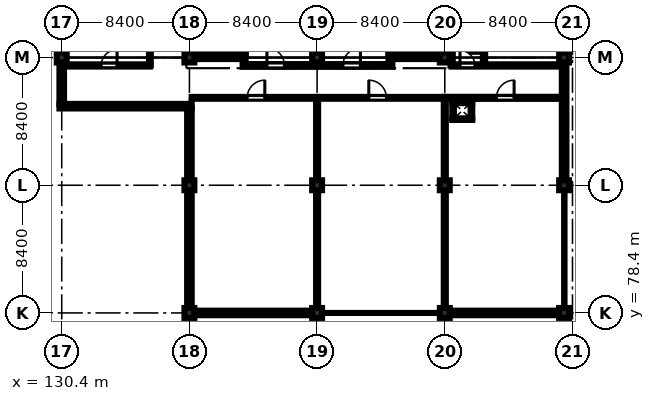
"""IFC4 building model, lengths in metres.
Left out: names, types, materials, properties, quantities, classifications, styles, units other than length and angle.
Written with IfcOpenShell. Run it as: python <this file> out.ifc"""

import sys

from ifc_helpers import new_model, si_unit, direction, frame, frame_2d, origin, origin_2d, place, context, subcontext, project, spatial, rectangle, extrude, element, fill, save


model = new_model("IFC4")
c1 = context("Model", 3, precision=1e-05, world=origin(), true_north=direction((0.0, 1.0)))
c2 = subcontext(c1, "Body", "Model", "MODEL_VIEW")
j1 = project(units=[si_unit("LENGTHUNIT", "METRE"), si_unit("PLANEANGLEUNIT", "RADIAN")], contexts=[c1])
p1 = place(None, origin())
s1 = spatial("IfcSite", under=j1, at=p1, CompositionType="ELEMENT")
p2 = place(p1, origin())
s2 = spatial("IfcBuilding", under=s1, at=p2, CompositionType="ELEMENT")
p3 = place(p2, frame((0.0, 0.0, 57.0)))
s3 = spatial("IfcBuildingStorey", under=s2, at=p3, CompositionType="ELEMENT", Elevation=57.0)
for number, where, z_axis, x_axis in (
    (1, (130.4, 95.2, 0.0), (0.0, 0.0, 1.0), (1.0, 0.0, 0.0)),
    (2, (138.8, 78.4, 0.0), (0.0, 0.0, 1.0), (1.0, 0.0, 0.0)),
    (3, (138.8, 86.8, 0.0), (0.0, 0.0, 1.0), (1.0, 0.0, 0.0)),
    (4, (138.8, 95.2, 0.0), (0.0, 0.0, 1.0), (1.0, 0.0, 0.0)),
    (5, (147.2, 78.4, 0.0), (0.0, 0.0, 1.0), (1.0, 0.0, 0.0)),
    (6, (147.2, 86.8, 0.0), (0.0, 0.0, 1.0), (1.0, 0.0, 0.0)),
    (7, (147.2, 95.2, 0.0), (0.0, 0.0, 1.0), (1.0, 0.0, 0.0)),
    (8, (155.6, 78.4, 0.0), (0.0, 0.0, 1.0), (1.0, 0.0, 0.0)),
    (9, (155.6, 86.8, 0.0), (0.0, 0.0, 1.0), (1.0, 0.0, 0.0)),
    (10, (155.6, 95.2, 0.0), (0.0, 0.0, 1.0), (1.0, 0.0, 0.0)),
    (11, (163.45, 78.4, 0.0), (0.0, 0.0, 1.0), (1.0, 0.0, 0.0)),
    (12, (163.45, 86.8, 0.0), (0.0, 0.0, 1.0), (1.0, 0.0, 0.0)),
    (13, (163.45, 95.2, 0.0), (0.0, 0.0, 1.0), (1.0, 0.0, 0.0)),
):
    element("IfcColumn", number, at=place(p3, frame(where, z_axis=z_axis, x_axis=x_axis)), inside=s3, PredefinedType="COLUMN", context=c2, shape_type="SweptSolid", body=[
        extrude(rectangle(XDim=0.65, YDim=0.65, at=origin_2d()), origin(), (0.0, 0.0, 1.0), 4.02),
    ])
p4 = place(p3, frame((138.7, 95.275, 0.0), z_axis=(0.0, 0.0, 1.0), x_axis=(1.0, 0.0, 0.0)))
e14 = element("IfcWall", 14, at=p4, inside=s3, PredefinedType="SHEAR", context=c2, shape_type="SweptSolid", body=[
    extrude(rectangle(XDim=3.8, YDim=0.35, at=frame_2d((1.9, 0.0))), origin(), (0.0, 0.0, 1.0), 4.02),
])
p5 = place(p3, frame((138.875, 95.45, 0.0), z_axis=(0.0, 0.0, 1.0), x_axis=(0.0, 1.0, 0.0)))
e15 = element("IfcWall", 15, at=p5, inside=s3, PredefinedType="SHEAR", context=c2, shape_type="SweptSolid", body=[
    extrude(rectangle(XDim=7.9, YDim=0.35, at=frame_2d((3.95, 0.0))), origin(), (0.0, 0.0, 1.0), 4.02),
])
p6 = place(p3, frame((142.325, 95.45, 0.0), z_axis=(0.0, 0.0, 1.0), x_axis=(0.0, 1.0, 0.0)))
e16 = element("IfcWall", 16, at=p6, inside=s3, PredefinedType="SHEAR", context=c2, shape_type="SweptSolid", body=[
    extrude(rectangle(XDim=7.9, YDim=0.35, at=frame_2d((3.95, 0.0))), origin(), (0.0, 0.0, 1.0), 4.02),
])
p7 = place(p6, frame((0.22, 0.0, 0.0)))
e17 = element("IfcOpeningElement", 17, at=p7, cuts=e16, PredefinedType="OPENING", context=c2, shape_type="SweptSolid", body=[
    extrude(rectangle(XDim=1.15, YDim=2.15, at=frame_2d((0.575, 1.075))), frame((0.0, 0.185, 0.0), z_axis=(0.0, -1.0, 0.0), x_axis=(1.0, 0.0, 0.0)), (0.0, 0.0, 1.0), 0.37),
])
p8 = place(p3, frame((151.9, 95.275, 0.0), z_axis=(0.0, 0.0, 1.0), x_axis=(1.0, 0.0, 0.0)))
e18 = element("IfcWall", 18, at=p8, inside=s3, PredefinedType="SHEAR", context=c2, shape_type="SweptSolid", body=[
    extrude(rectangle(XDim=3.8, YDim=0.35, at=frame_2d((1.9, 0.0))), origin(), (0.0, 0.0, 1.0), 4.02),
])
p9 = place(p3, frame((152.075, 95.45, 0.0), z_axis=(0.0, 0.0, 1.0), x_axis=(0.0, 1.0, 0.0)))
e19 = element("IfcWall", 19, at=p9, inside=s3, PredefinedType="SHEAR", context=c2, shape_type="SweptSolid", body=[
    extrude(rectangle(XDim=7.9, YDim=0.35, at=frame_2d((3.95, 0.0))), origin(), (0.0, 0.0, 1.0), 4.02),
])
p10 = place(p9, frame((0.35, 0.0, 0.0)))
e20 = element("IfcOpeningElement", 20, at=p10, cuts=e19, PredefinedType="OPENING", context=c2, shape_type="SweptSolid", body=[
    extrude(rectangle(XDim=1.15, YDim=2.15, at=frame_2d((0.575, 1.075))), frame((0.0, 0.185, 0.0), z_axis=(0.0, -1.0, 0.0), x_axis=(1.0, 0.0, 0.0)), (0.0, 0.0, 1.0), 0.37),
])
p11 = place(p3, frame((155.525, 95.45, 0.0), z_axis=(0.0, 0.0, 1.0), x_axis=(0.0, 1.0, 0.0)))
e21 = element("IfcWall", 21, at=p11, inside=s3, PredefinedType="SHEAR", context=c2, shape_type="SweptSolid", body=[
    extrude(rectangle(XDim=7.9, YDim=0.35, at=frame_2d((3.95, 0.0))), origin(), (0.0, 0.0, 1.0), 4.02),
])
p12 = place(p3, frame((146.875, 78.4, 0.0), z_axis=(0.0, 0.0, 1.0), x_axis=(-1.0, 0.0, 0.0)))
e22 = element("IfcWall", 22, at=p12, inside=s3, PredefinedType="STANDARD", context=c2, shape_type="SweptSolid", body=[
    extrude(rectangle(XDim=7.75, YDim=0.3, at=frame_2d((3.875, 0.0))), origin(), (0.0, 0.0, 1.0), 3.32),
])
p13 = place(p12, frame((1.15, 0.0, 0.95)))
e23 = element("IfcOpeningElement", 23, at=p13, cuts=e22, PredefinedType="OPENING", context=c2, shape_type="SweptSolid", body=[
    extrude(rectangle(XDim=1.75, YDim=1.85, at=frame_2d((0.875, 0.925))), frame((0.0, 0.16, 0.0), z_axis=(0.0, -1.0, 0.0), x_axis=(1.0, 0.0, 0.0)), (0.0, 0.0, 1.0), 0.32),
])
p14 = place(p3, frame((163.125, 78.4, 0.0), z_axis=(0.0, 0.0, 1.0), x_axis=(-1.0, 0.0, 0.0)))
e24 = element("IfcWall", 24, at=p14, inside=s3, PredefinedType="STANDARD", context=c2, shape_type="SweptSolid", body=[
    extrude(rectangle(XDim=7.2, YDim=0.3, at=frame_2d((3.6, 0.0))), origin(), (0.0, 0.0, 1.0), 3.32),
])
p15 = place(p14, frame((1.15, 0.0, 0.95)))
e25 = element("IfcOpeningElement", 25, at=p15, cuts=e24, PredefinedType="OPENING", context=c2, shape_type="SweptSolid", body=[
    extrude(rectangle(XDim=1.75, YDim=1.85, at=frame_2d((0.875, 0.925))), frame((0.0, 0.16, 0.0), z_axis=(0.0, -1.0, 0.0), x_axis=(1.0, 0.0, 0.0)), (0.0, 0.0, 1.0), 0.32),
])
p16 = place(p3, frame((163.45, 94.875, 0.0), z_axis=(0.0, 0.0, 1.0), x_axis=(0.0, -1.0, 0.0)))
e26 = element("IfcWall", 26, at=p16, inside=s3, PredefinedType="STANDARD", context=c2, shape_type="SweptSolid", body=[
    extrude(rectangle(XDim=7.75, YDim=0.3, at=frame_2d((3.875, 0.0))), origin(), (0.0, 0.0, 1.0), 3.32),
])
p17 = place(p16, frame((4.2, 0.0, 1.1)))
e27 = element("IfcOpeningElement", 27, at=p17, cuts=e26, PredefinedType="OPENING", context=c2, shape_type="SweptSolid", body=[
    extrude(rectangle(XDim=1.8, YDim=1.8, at=frame_2d((0.9, 0.9))), frame((0.0, 0.16, 0.0), z_axis=(0.0, -1.0, 0.0), x_axis=(1.0, 0.0, 0.0)), (0.0, 0.0, 1.0), 0.32),
])
p18 = place(p3, frame((163.45, 103.275, 0.0), z_axis=(0.0, 0.0, 1.0), x_axis=(0.0, -1.0, 0.0)))
e28 = element("IfcWall", 28, at=p18, inside=s3, PredefinedType="STANDARD", context=c2, shape_type="SweptSolid", body=[
    extrude(rectangle(XDim=7.75, YDim=0.3, at=frame_2d((3.875, 0.0))), origin(), (0.0, 0.0, 1.0), 3.32),
])
p19 = place(p18, frame((1.15, 0.0, 1.1)))
e29 = element("IfcOpeningElement", 29, at=p19, cuts=e28, PredefinedType="OPENING", context=c2, shape_type="SweptSolid", body=[
    extrude(rectangle(XDim=1.4, YDim=1.4, at=frame_2d((0.7, 0.7))), frame((0.0, 0.16, 0.0), z_axis=(0.0, -1.0, 0.0), x_axis=(1.0, 0.0, 0.0)), (0.0, 0.0, 1.0), 0.32),
])
p20 = place(p3, frame((130.4, 92.15, 0.0), z_axis=(0.0, 0.0, 1.0), x_axis=(0.0, 1.0, 0.0)))
e30 = element("IfcWall", 30, at=p20, inside=s3, PredefinedType="STANDARD", context=c2, shape_type="SweptSolid", body=[
    extrude(rectangle(XDim=2.725, YDim=0.3, at=frame_2d((1.363, 0.0))), origin(), (0.0, 0.0, 1.0), 4.02),
])
p21 = place(p3, frame((138.8, 78.725, 0.0), z_axis=(0.0, 0.0, 1.0), x_axis=(0.0, 1.0, 0.0)))
e31 = element("IfcWall", 31, at=p21, inside=s3, PredefinedType="STANDARD", context=c2, shape_type="SweptSolid", body=[
    extrude(rectangle(XDim=7.75, YDim=0.3, at=frame_2d((3.875, 0.0))), origin(), (0.0, 0.0, 1.0), 3.32),
])
p22 = place(p21, frame((2.4, 0.0, 0.95)))
e32 = element("IfcOpeningElement", 32, at=p22, cuts=e31, PredefinedType="OPENING", context=c2, shape_type="SweptSolid", body=[
    extrude(rectangle(XDim=1.5, YDim=1.8, at=frame_2d((0.75, 0.9))), frame((0.0, 0.16, 0.0), z_axis=(0.0, -1.0, 0.0), x_axis=(1.0, 0.0, 0.0)), (0.0, 0.0, 1.0), 0.32),
])
p23 = place(p3, frame((138.8, 87.125, 0.0), z_axis=(0.0, 0.0, 1.0), x_axis=(0.0, 1.0, 0.0)))
e33 = element("IfcWall", 33, at=p23, inside=s3, PredefinedType="STANDARD", context=c2, shape_type="SweptSolid", body=[
    extrude(rectangle(XDim=4.725, YDim=0.3, at=frame_2d((2.363, 0.0))), origin(), (0.0, 0.0, 1.0), 3.32),
])
p24 = place(p23, frame((2.4, 0.0, 0.95)))
e34 = element("IfcOpeningElement", 34, at=p24, cuts=e33, PredefinedType="OPENING", context=c2, shape_type="SweptSolid", body=[
    extrude(rectangle(XDim=1.5, YDim=1.8, at=frame_2d((0.75, 0.9))), frame((0.0, 0.16, 0.0), z_axis=(0.0, -1.0, 0.0), x_axis=(1.0, 0.0, 0.0)), (0.0, 0.0, 1.0), 0.32),
])
p25 = place(p3, frame((130.4, 95.525, 0.0), z_axis=(0.0, 0.0, 1.0), x_axis=(0.0, 1.0, 0.0)))
e35 = element("IfcWall", 35, at=p25, inside=s3, PredefinedType="STANDARD", context=c2, shape_type="SweptSolid", body=[
    extrude(rectangle(XDim=7.75, YDim=0.3, at=frame_2d((3.875, 0.0))), origin(), (0.0, 0.0, 1.0), 3.32),
])
p26 = place(p25, frame((2.4, 0.0, 1.0)))
e36 = element("IfcOpeningElement", 36, at=p26, cuts=e35, PredefinedType="OPENING", context=c2, shape_type="SweptSolid", body=[
    extrude(rectangle(XDim=1.8, YDim=1.8, at=frame_2d((0.9, 0.9))), frame((0.0, 0.16, 0.0), z_axis=(0.0, -1.0, 0.0), x_axis=(1.0, 0.0, 0.0)), (0.0, 0.0, 1.0), 0.32),
])
p27 = place(p3, frame((138.95, 92.0, 0.0), z_axis=(0.0, 0.0, 1.0), x_axis=(-1.0, 0.0, 0.0)))
e37 = element("IfcWall", 37, at=p27, inside=s3, PredefinedType="STANDARD", context=c2, shape_type="SweptSolid", body=[
    extrude(rectangle(XDim=8.7, YDim=0.3, at=frame_2d((4.35, 0.0))), origin(), (0.0, 0.0, 1.0), 4.02),
])
p28 = place(p3, frame((142.3, 94.68, 0.0), z_axis=(0.0, 0.0, 1.0), x_axis=(1.0, 0.0, 0.0)))
e38 = element("IfcWall", 38, at=p28, inside=s3, PredefinedType="STANDARD", context=c2, shape_type="SweptSolid", body=[
    extrude(rectangle(XDim=4.8, YDim=0.18, at=frame_2d((2.4, 0.0))), origin(), (0.0, 0.0, 1.0), 4.02),
])
p29 = place(p28, frame((1.6, 0.0, 0.0)))
e39 = element("IfcOpeningElement", 39, at=p29, cuts=e38, PredefinedType="OPENING", context=c2, shape_type="SweptSolid", body=[
    extrude(rectangle(XDim=1.15, YDim=2.15, at=frame_2d((0.575, 1.075))), frame((0.0, 0.1, 0.0), z_axis=(0.0, -1.0, 0.0), x_axis=(1.0, 0.0, 0.0)), (0.0, 0.0, 1.0), 0.2),
])
p30 = place(p3, frame((147.3, 94.68, 0.0), z_axis=(0.0, 0.0, 1.0), x_axis=(1.0, 0.0, 0.0)))
e40 = element("IfcWall", 40, at=p30, inside=s3, PredefinedType="STANDARD", context=c2, shape_type="SweptSolid", body=[
    extrude(rectangle(XDim=4.85, YDim=0.18, at=frame_2d((2.425, 0.0))), origin(), (0.0, 0.0, 1.0), 4.02),
])
p31 = place(p30, frame((1.6, 0.0, 0.0)))
e41 = element("IfcOpeningElement", 41, at=p31, cuts=e40, PredefinedType="OPENING", context=c2, shape_type="SweptSolid", body=[
    extrude(rectangle(XDim=1.15, YDim=2.15, at=frame_2d((0.575, 1.075))), frame((0.0, 0.1, 0.0), z_axis=(0.0, -1.0, 0.0), x_axis=(1.0, 0.0, 0.0)), (0.0, 0.0, 1.0), 0.2),
])
p32 = place(p3, frame((156.05, 94.68, 0.0), z_axis=(0.0, 0.0, 1.0), x_axis=(1.0, 0.0, 0.0)))
e42 = element("IfcWall", 42, at=p32, inside=s3, PredefinedType="PARTITIONING", context=c2, shape_type="SweptSolid", body=[
    extrude(rectangle(XDim=7.15, YDim=0.15, at=frame_2d((3.575, 0.0))), origin(), (0.0, 0.0, 1.0), 4.02),
])
p33 = place(p32, frame((0.55, 0.0, 0.0)))
e43 = element("IfcOpeningElement", 43, at=p33, cuts=e42, PredefinedType="OPENING", context=c2, shape_type="SweptSolid", body=[
    extrude(rectangle(XDim=0.98, YDim=2.12, at=frame_2d((0.49, 1.06))), frame((0.0, 0.085, 0.0), z_axis=(0.0, -1.0, 0.0), x_axis=(1.0, 0.0, 0.0)), (0.0, 0.0, 1.0), 0.17),
])
p34 = place(p3, frame((158.18, 94.68, 0.0), z_axis=(0.0, 0.0, 1.0), x_axis=(0.0, 1.0, 0.0)))
e44 = element("IfcWall", 44, at=p34, inside=s3, PredefinedType="PARTITIONING", context=c2, shape_type="SweptSolid", body=[
    extrude(rectangle(XDim=8.57, YDim=0.15, at=frame_2d((4.285, 0.0))), origin(), (0.0, 0.0, 1.0), 4.02),
])
p35 = place(p34, frame((0.8, 0.0, 0.0)))
e45 = element("IfcOpeningElement", 45, at=p35, cuts=e44, PredefinedType="OPENING", context=c2, shape_type="SweptSolid", body=[
    extrude(rectangle(XDim=1.0, YDim=2.12, at=frame_2d((0.5, 1.06))), frame((0.0, 0.085, 0.0), z_axis=(0.0, -1.0, 0.0), x_axis=(1.0, 0.0, 0.0)), (0.0, 0.0, 1.0), 0.17),
])
p36 = place(p34, frame((3.5, 0.0, 0.0)))
e46 = element("IfcOpeningElement", 46, at=p36, cuts=e44, PredefinedType="OPENING", context=c2, shape_type="SweptSolid", body=[
    extrude(rectangle(XDim=0.92, YDim=2.1, at=frame_2d((0.46, 1.05))), frame((0.0, 0.085, 0.0), z_axis=(0.0, -1.0, 0.0), x_axis=(1.0, 0.0, 0.0)), (0.0, 0.0, 1.0), 0.17),
])
p37 = place(p34, frame((6.4, 0.0, 0.0)))
e47 = element("IfcOpeningElement", 47, at=p37, cuts=e44, PredefinedType="OPENING", context=c2, shape_type="SweptSolid", body=[
    extrude(rectangle(XDim=0.92, YDim=2.1, at=frame_2d((0.46, 1.05))), frame((0.0, 0.085, 0.0), z_axis=(0.0, -1.0, 0.0), x_axis=(1.0, 0.0, 0.0)), (0.0, 0.0, 1.0), 0.17),
])
p38 = place(p3, frame((156.05, 94.68, 0.0), z_axis=(0.0, 0.0, 1.0), x_axis=(0.0, 1.0, 0.0)))
e48 = element("IfcWall", 48, at=p38, inside=s3, PredefinedType="PARTITIONING", context=c2, shape_type="SweptSolid", body=[
    extrude(rectangle(XDim=8.57, YDim=0.15, at=frame_2d((4.285, 0.0))), origin(), (0.0, 0.0, 1.0), 4.02),
])
p39 = place(p3, frame((136.2, 94.68, 0.0), z_axis=(0.0, 0.0, 1.0), x_axis=(0.0, 1.0, 0.0)))
e49 = element("IfcWall", 49, at=p39, inside=s3, PredefinedType="PARTITIONING", context=c2, shape_type="SweptSolid", body=[
    extrude(rectangle(XDim=9.07, YDim=0.12, at=frame_2d((4.535, 0.0))), origin(), (0.0, 0.0, 1.0), 4.02),
])
p40 = place(p3, frame((130.8, 94.68, 0.0), z_axis=(0.0, 0.0, 1.0), x_axis=(1.0, 0.0, 0.0)))
e50 = element("IfcWall", 50, at=p40, inside=s3, PredefinedType="PARTITIONING", context=c2, shape_type="SweptSolid", body=[
    extrude(rectangle(XDim=5.4, YDim=0.145, at=frame_2d((2.7, 0.0))), origin(), (0.0, 0.0, 1.0), 4.02),
])
p41 = place(p40, frame((2.2, 0.0, 0.0)))
e51 = element("IfcOpeningElement", 51, at=p41, cuts=e50, PredefinedType="OPENING", context=c2, shape_type="SweptSolid", body=[
    extrude(rectangle(XDim=1.04, YDim=2.16, at=frame_2d((0.52, 1.08))), frame((0.0, 0.083, 0.0), z_axis=(0.0, -1.0, 0.0), x_axis=(1.0, 0.0, 0.0)), (0.0, 0.0, 1.0), 0.165),
])
p42 = place(p3, frame((138.95, 92.55, 0.0), z_axis=(0.0, 0.0, 1.0), x_axis=(1.0, 0.0, 0.0)))
e52 = element("IfcWall", 52, at=p42, inside=s3, PredefinedType="PARTITIONING", context=c2, shape_type="SweptSolid", body=[
    extrude(rectangle(XDim=8.25, YDim=0.12, at=frame_2d((4.125, 0.0))), origin(), (0.0, 0.0, 1.0), 4.02),
])
p43 = place(p42, frame((3.65, 0.0, 0.0)))
e53 = element("IfcOpeningElement", 53, at=p43, cuts=e52, PredefinedType="OPENING", context=c2, shape_type="SweptSolid", body=[
    extrude(rectangle(XDim=1.16, YDim=2.2, at=frame_2d((0.58, 1.1))), frame((0.0, 0.07, 0.0), z_axis=(0.0, -1.0, 0.0), x_axis=(1.0, 0.0, 0.0)), (0.0, 0.0, 1.0), 0.14),
])
p44 = place(p3, frame((147.2, 92.55, 0.0), z_axis=(0.0, 0.0, 1.0), x_axis=(1.0, 0.0, 0.0)))
e54 = element("IfcWall", 54, at=p44, inside=s3, PredefinedType="PARTITIONING", context=c2, shape_type="SweptSolid", body=[
    extrude(rectangle(XDim=8.4, YDim=0.12, at=frame_2d((4.2, 0.0))), origin(), (0.0, 0.0, 1.0), 4.02),
])
p45 = place(p44, frame((3.4, 0.0, 0.0)))
e55 = element("IfcOpeningElement", 55, at=p45, cuts=e54, PredefinedType="OPENING", context=c2, shape_type="SweptSolid", body=[
    extrude(rectangle(XDim=1.16, YDim=2.2, at=frame_2d((0.58, 1.1))), frame((0.0, 0.07, 0.0), z_axis=(0.0, -1.0, 0.0), x_axis=(1.0, 0.0, 0.0)), (0.0, 0.0, 1.0), 0.14),
])
p46 = place(p3, frame((147.2, 78.55, 0.0), z_axis=(0.0, 0.0, 1.0), x_axis=(0.0, 1.0, 0.0)))
e56 = element("IfcWall", 56, at=p46, inside=s3, PredefinedType="PARTITIONING", context=c2, shape_type="SweptSolid", body=[
    extrude(rectangle(XDim=14.0, YDim=0.135, at=frame_2d((7.0, 0.0))), origin(), (0.0, 0.0, 1.0), 3.32),
])
p47 = place(p3, frame((155.6, 92.55, 0.0), z_axis=(0.0, 0.0, 1.0), x_axis=(1.0, 0.0, 0.0)))
e57 = element("IfcWall", 57, at=p47, inside=s3, PredefinedType="PARTITIONING", context=c2, shape_type="SweptSolid", body=[
    extrude(rectangle(XDim=7.75, YDim=0.135, at=frame_2d((3.875, 0.0))), origin(), (0.0, 0.0, 1.0), 4.02),
])
p48 = place(p47, frame((3.4, 0.0, 0.0)))
e58 = element("IfcOpeningElement", 58, at=p48, cuts=e57, PredefinedType="OPENING", context=c2, shape_type="SweptSolid", body=[
    extrude(rectangle(XDim=1.16, YDim=2.2, at=frame_2d((0.58, 1.1))), frame((0.0, 0.077, 0.0), z_axis=(0.0, -1.0, 0.0), x_axis=(1.0, 0.0, 0.0)), (0.0, 0.0, 1.0), 0.155),
])
p49 = place(p3, frame((155.6, 78.55, 0.0), z_axis=(0.0, 0.0, 1.0), x_axis=(0.0, 1.0, 0.0)))
e59 = element("IfcWall", 59, at=p49, inside=s3, PredefinedType="PARTITIONING", context=c2, shape_type="SweptSolid", body=[
    extrude(rectangle(XDim=14.0, YDim=0.135, at=frame_2d((7.0, 0.0))), origin(), (0.0, 0.0, 1.0), 3.32),
])
for number, where, z_axis, x_axis in (
    (60, (156.095, 91.147, 0.0), (0.0, 0.0, 1.0), (1.0, 0.0, 0.0)),
    (61, (156.095, 92.252, 0.0), (0.0, 0.0, 1.0), (1.0, 0.0, 0.0)),
):
    element("IfcWall", number, at=place(p3, frame(where, z_axis=z_axis, x_axis=x_axis)), inside=s3, PredefinedType="PARTITIONING", context=c2, shape_type="SweptSolid", body=[
        extrude(rectangle(XDim=1.31, YDim=0.105, at=frame_2d((0.655, 0.0))), origin(), (0.0, 0.0, 1.0), 4.02),
    ])
for number, where, z_axis, x_axis in (
    (62, (156.147, 91.2, 0.0), (0.0, 0.0, 1.0), (0.0, 1.0, 0.0)),
    (63, (157.353, 91.2, 0.0), (0.0, 0.0, 1.0), (0.0, 1.0, 0.0)),
):
    element("IfcWall", number, at=place(p3, frame(where, z_axis=z_axis, x_axis=x_axis)), inside=s3, PredefinedType="PARTITIONING", context=c2, shape_type="SweptSolid", body=[
        extrude(rectangle(XDim=1.0, YDim=0.105, at=frame_2d((0.5, 0.0))), origin(), (0.0, 0.0, 1.0), 4.02),
    ])
p50 = place(p13, origin())
e64 = element("IfcWindow", 64, at=p50, inside=s3, PartitioningType="DOUBLE_PANEL_VERTICAL", PredefinedType="WINDOW", context=c2, shape_type="SweptSolid", body=[
    extrude(rectangle(XDim=1.75, YDim=1.85, at=frame_2d((0.875, 0.925))), frame((0.0, 0.03, 0.0), z_axis=(0.0, -1.0, 0.0), x_axis=(1.0, 0.0, 0.0)), (0.0, 0.0, 1.0), 0.06),
])
fill(e23, e64)
p51 = place(p15, origin())
e65 = element("IfcWindow", 65, at=p51, inside=s3, PartitioningType="DOUBLE_PANEL_VERTICAL", PredefinedType="WINDOW", context=c2, shape_type="SweptSolid", body=[
    extrude(rectangle(XDim=1.75, YDim=1.85, at=frame_2d((0.875, 0.925))), frame((0.0, 0.03, 0.0), z_axis=(0.0, -1.0, 0.0), x_axis=(1.0, 0.0, 0.0)), (0.0, 0.0, 1.0), 0.06),
])
fill(e25, e65)
p52 = place(p17, origin())
e66 = element("IfcWindow", 66, at=p52, inside=s3, PartitioningType="DOUBLE_PANEL_VERTICAL", PredefinedType="WINDOW", context=c2, shape_type="SweptSolid", body=[
    extrude(rectangle(XDim=1.8, YDim=1.8, at=frame_2d((0.9, 0.9))), frame((0.0, 0.03, 0.0), z_axis=(0.0, -1.0, 0.0), x_axis=(1.0, 0.0, 0.0)), (0.0, 0.0, 1.0), 0.06),
])
fill(e27, e66)
p53 = place(p22, origin())
e67 = element("IfcWindow", 67, at=p53, inside=s3, PartitioningType="DOUBLE_PANEL_VERTICAL", PredefinedType="WINDOW", context=c2, shape_type="SweptSolid", body=[
    extrude(rectangle(XDim=1.5, YDim=1.8, at=frame_2d((0.75, 0.9))), frame((0.0, 0.03, 0.0), z_axis=(0.0, -1.0, 0.0), x_axis=(1.0, 0.0, 0.0)), (0.0, 0.0, 1.0), 0.06),
])
fill(e32, e67)
p54 = place(p24, origin())
e68 = element("IfcWindow", 68, at=p54, inside=s3, PartitioningType="DOUBLE_PANEL_VERTICAL", PredefinedType="WINDOW", context=c2, shape_type="SweptSolid", body=[
    extrude(rectangle(XDim=1.5, YDim=1.8, at=frame_2d((0.75, 0.9))), frame((0.0, 0.03, 0.0), z_axis=(0.0, -1.0, 0.0), x_axis=(1.0, 0.0, 0.0)), (0.0, 0.0, 1.0), 0.06),
])
fill(e34, e68)
p55 = place(p29, origin())
e69 = element("IfcDoor", 69, at=p55, inside=s3, OperationType="SINGLE_SWING_LEFT", PredefinedType="DOOR", context=c2, shape_type="SweptSolid", body=[
    extrude(rectangle(XDim=1.15, YDim=2.15, at=frame_2d((0.575, 1.075))), frame((0.0, 0.025, 0.0), z_axis=(0.0, -1.0, 0.0), x_axis=(1.0, 0.0, 0.0)), (0.0, 0.0, 1.0), 0.05),
])
fill(e39, e69)
p56 = place(p31, origin())
e70 = element("IfcDoor", 70, at=p56, inside=s3, OperationType="SINGLE_SWING_RIGHT", PredefinedType="DOOR", context=c2, shape_type="SweptSolid", body=[
    extrude(rectangle(XDim=1.15, YDim=2.15, at=frame_2d((0.575, 1.075))), frame((0.0, 0.025, 0.0), z_axis=(0.0, -1.0, 0.0), x_axis=(1.0, 0.0, 0.0)), (0.0, 0.0, 1.0), 0.05),
])
fill(e41, e70)
p57 = place(p33, origin())
e71 = element("IfcDoor", 71, at=p57, inside=s3, OperationType="SINGLE_SWING_LEFT", PredefinedType="DOOR", context=c2, shape_type="SweptSolid", body=[
    extrude(rectangle(XDim=0.98, YDim=2.12, at=frame_2d((0.49, 1.06))), frame((0.0, 0.025, 0.0), z_axis=(0.0, -1.0, 0.0), x_axis=(1.0, 0.0, 0.0)), (0.0, 0.0, 1.0), 0.05),
])
fill(e43, e71)
p58 = place(p35, origin())
e72 = element("IfcDoor", 72, at=p58, inside=s3, OperationType="SINGLE_SWING_LEFT", PredefinedType="DOOR", context=c2, shape_type="SweptSolid", body=[
    extrude(rectangle(XDim=1.0, YDim=2.12, at=frame_2d((0.5, 1.06))), frame((0.0, 0.025, 0.0), z_axis=(0.0, -1.0, 0.0), x_axis=(1.0, 0.0, 0.0)), (0.0, 0.0, 1.0), 0.05),
])
fill(e45, e72)
p59 = place(p41, origin())
e73 = element("IfcDoor", 73, at=p59, inside=s3, OperationType="SINGLE_SWING_RIGHT", PredefinedType="DOOR", context=c2, shape_type="SweptSolid", body=[
    extrude(rectangle(XDim=1.04, YDim=2.16, at=frame_2d((0.52, 1.08))), frame((0.0, 0.025, 0.0), z_axis=(0.0, -1.0, 0.0), x_axis=(1.0, 0.0, 0.0)), (0.0, 0.0, 1.0), 0.05),
])
fill(e51, e73)
p60 = place(p43, origin())
e74 = element("IfcDoor", 74, at=p60, inside=s3, OperationType="SINGLE_SWING_RIGHT", PredefinedType="DOOR", context=c2, shape_type="SweptSolid", body=[
    extrude(rectangle(XDim=1.16, YDim=2.2, at=frame_2d((0.58, 1.1))), frame((0.0, 0.025, 0.0), z_axis=(0.0, -1.0, 0.0), x_axis=(1.0, 0.0, 0.0)), (0.0, 0.0, 1.0), 0.05),
])
fill(e53, e74)
p61 = place(p45, origin())
e75 = element("IfcDoor", 75, at=p61, inside=s3, OperationType="SINGLE_SWING_LEFT", PredefinedType="DOOR", context=c2, shape_type="SweptSolid", body=[
    extrude(rectangle(XDim=1.16, YDim=2.2, at=frame_2d((0.58, 1.1))), frame((0.0, 0.025, 0.0), z_axis=(0.0, -1.0, 0.0), x_axis=(1.0, 0.0, 0.0)), (0.0, 0.0, 1.0), 0.05),
])
fill(e55, e75)
p62 = place(p48, origin())
e76 = element("IfcDoor", 76, at=p62, inside=s3, OperationType="SINGLE_SWING_RIGHT", PredefinedType="DOOR", context=c2, shape_type="SweptSolid", body=[
    extrude(rectangle(XDim=1.16, YDim=2.2, at=frame_2d((0.58, 1.1))), frame((0.0, 0.025, 0.0), z_axis=(0.0, -1.0, 0.0), x_axis=(1.0, 0.0, 0.0)), (0.0, 0.0, 1.0), 0.05),
])
fill(e58, e76)
save(model, sys.argv[1])
